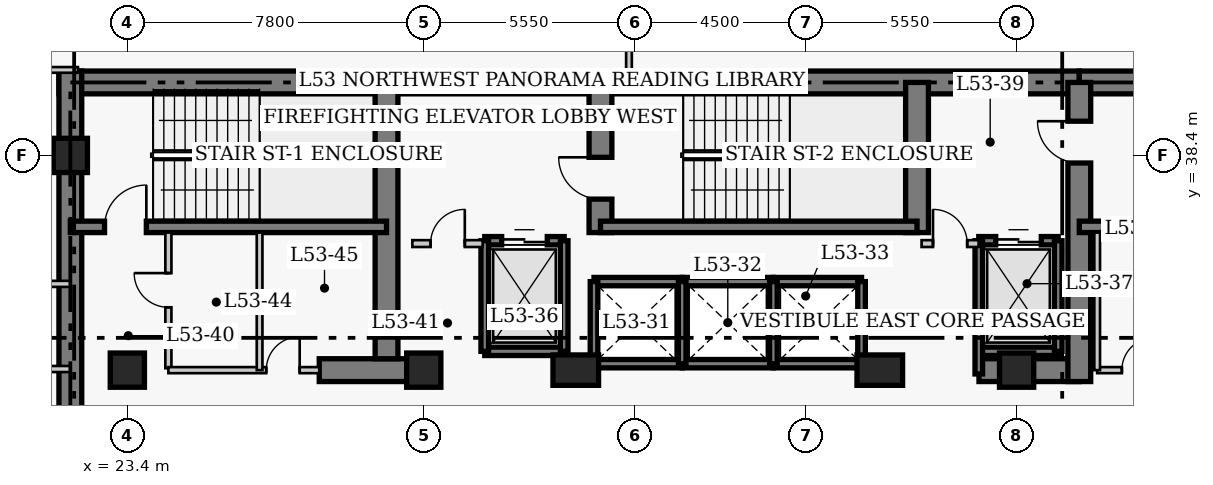
"""IFC4 building model, lengths in metres.
Left out: names, types, materials, properties, quantities, classifications, styles, units other than length and angle.
Written with IfcOpenShell. Run it as: python <this file> out.ifc"""

import sys

from ifc_helpers import new_model, si_unit, direction, frame, frame_2d, origin, origin_2d, place, context, subcontext, project, spatial, rectangle, extrude, element, fill, save


model = new_model("IFC4")
c1 = context("Model", 3, precision=1e-05, world=origin(), true_north=direction((0.0, 1.0)))
c2 = subcontext(c1, "Body", "Model", "MODEL_VIEW")
j1 = project(units=[si_unit("LENGTHUNIT", "METRE"), si_unit("PLANEANGLEUNIT", "RADIAN")], contexts=[c1])
p1 = place(None, origin())
s1 = spatial("IfcSite", under=j1, at=p1, CompositionType="ELEMENT")
p2 = place(p1, origin())
s2 = spatial("IfcBuilding", under=s1, at=p2, CompositionType="ELEMENT")
p3 = place(p2, frame((0.0, 0.0, 212.4)))
s3 = spatial("IfcBuildingStorey", under=s2, at=p3, CompositionType="ELEMENT", Elevation=212.4)
p4 = place(p3, frame((21.6, 40.32, 0.0), z_axis=(0.0, 0.0, 1.0), x_axis=(1.0, 0.0, 0.0)))
e1 = element("IfcWall", 1, at=p4, inside=s3, PredefinedType="SHEAR", context=c2, shape_type="SweptSolid", body=[
    extrude(rectangle(XDim=14.25, YDim=0.6, at=frame_2d((7.125, 0.0))), origin(), (0.0, 0.0, 1.0), 3.9),
])
p5 = place(p3, frame((35.85, 40.32, 0.0), z_axis=(0.0, 0.0, 1.0), x_axis=(1.0, 0.0, 0.0)))
e2 = element("IfcWall", 2, at=p5, inside=s3, PredefinedType="SHEAR", context=c2, shape_type="SweptSolid", body=[
    extrude(rectangle(XDim=12.6, YDim=0.6, at=frame_2d((6.3, 0.0))), origin(), (0.0, 0.0, 1.0), 3.9),
])
p6 = place(p3, frame((48.45, 40.32, 0.0), z_axis=(0.0, 0.0, 1.0), x_axis=(1.0, 0.0, 0.0)))
e3 = element("IfcWall", 3, at=p6, inside=s3, PredefinedType="SHEAR", context=c2, shape_type="SweptSolid", body=[
    extrude(rectangle(XDim=8.67, YDim=0.6, at=frame_2d((4.335, 0.0))), origin(), (0.0, 0.0, 1.0), 3.9),
])
p7 = place(p3, frame((21.9, 27.05, 0.0), z_axis=(0.0, 0.0, 1.0), x_axis=(0.0, 1.0, 0.0)))
e4 = element("IfcWall", 4, at=p7, inside=s3, PredefinedType="SHEAR", context=c2, shape_type="SweptSolid", body=[
    extrude(rectangle(XDim=13.57, YDim=0.6, at=frame_2d((6.785, 0.0))), origin(), (0.0, 0.0, 1.0), 3.9),
])
p8 = place(p3, frame((28.45, 32.75, 0.0), z_axis=(0.0, 0.0, 1.0), x_axis=(1.0, 0.0, 0.0)))
e5 = element("IfcWall", 5, at=p8, inside=s3, PredefinedType="SHEAR", context=c2, shape_type="SweptSolid", body=[
    extrude(rectangle(XDim=2.4, YDim=0.6, at=frame_2d((1.2, 0.0))), origin(), (0.0, 0.0, 1.0), 3.9),
])
p9 = place(p3, frame((45.81, 32.75, 0.0), z_axis=(0.0, 0.0, 1.0), x_axis=(1.0, 0.0, 0.0)))
e6 = element("IfcWall", 6, at=p9, inside=s3, PredefinedType="SHEAR", context=c2, shape_type="SweptSolid", body=[
    extrude(rectangle(XDim=2.64, YDim=0.6, at=frame_2d((1.32, 0.0))), origin(), (0.0, 0.0, 1.0), 3.9),
])
p10 = place(p3, frame((30.22, 33.05, 0.0), z_axis=(0.0, 0.0, 1.0), x_axis=(0.0, 1.0, 0.0)))
e7 = element("IfcWall", 7, at=p10, inside=s3, PredefinedType="SHEAR", context=c2, shape_type="SweptSolid", body=[
    extrude(rectangle(XDim=7.27, YDim=0.6, at=frame_2d((3.635, 0.0))), origin(), (0.0, 0.0, 1.0), 3.9),
])
p11 = place(p3, frame((35.85, 36.37, 0.0), z_axis=(0.0, 0.0, 1.0), x_axis=(0.0, 1.0, 0.0)))
e8 = element("IfcWall", 8, at=p11, inside=s3, PredefinedType="SHEAR", context=c2, shape_type="SweptSolid", body=[
    extrude(rectangle(XDim=3.95, YDim=0.6, at=frame_2d((1.975, 0.0))), origin(), (0.0, 0.0, 1.0), 3.9),
])
p12 = place(p11, frame((0.88, 0.0, 0.0)))
e9 = element("IfcOpeningElement", 9, at=p12, cuts=e8, PredefinedType="OPENING", context=c2, shape_type="SweptSolid", body=[
    extrude(rectangle(XDim=1.1, YDim=2.15, at=frame_2d((0.55, 1.075))), frame((0.0, 0.31, 0.0), z_axis=(0.0, -1.0, 0.0), x_axis=(1.0, 0.0, 0.0)), (0.0, 0.0, 1.0), 0.62),
])
p13 = place(p3, frame((44.18, 36.37, 0.0), z_axis=(0.0, 0.0, 1.0), x_axis=(0.0, 1.0, 0.0)))
e10 = element("IfcWall", 10, at=p13, inside=s3, PredefinedType="SHEAR", context=c2, shape_type="SweptSolid", body=[
    extrude(rectangle(XDim=3.95, YDim=0.6, at=frame_2d((1.975, 0.0))), origin(), (0.0, 0.0, 1.0), 3.9),
])
p14 = place(p3, frame((48.45, 32.45, 0.0), z_axis=(0.0, 0.0, 1.0), x_axis=(0.0, 1.0, 0.0)))
e11 = element("IfcWall", 11, at=p14, inside=s3, PredefinedType="SHEAR", context=c2, shape_type="SweptSolid", body=[
    extrude(rectangle(XDim=7.87, YDim=0.6, at=frame_2d((3.935, 0.0))), origin(), (0.0, 0.0, 1.0), 3.9),
])
p15 = place(p14, frame((5.75, 0.0, 0.0)))
e12 = element("IfcOpeningElement", 12, at=p15, cuts=e11, PredefinedType="OPENING", context=c2, shape_type="SweptSolid", body=[
    extrude(rectangle(XDim=1.1, YDim=2.15, at=frame_2d((0.55, 1.075))), frame((0.0, 0.31, 0.0), z_axis=(0.0, -1.0, 0.0), x_axis=(1.0, 0.0, 0.0)), (0.0, 0.0, 1.0), 0.62),
])
p16 = place(p3, frame((21.9, 36.52, 0.0), z_axis=(0.0, 0.0, 1.0), x_axis=(1.0, 0.0, 0.0)))
e13 = element("IfcWall", 13, at=p16, inside=s3, PredefinedType="SHEAR", context=c2, shape_type="SweptSolid", body=[
    extrude(rectangle(XDim=8.32, YDim=0.3, at=frame_2d((4.16, 0.0))), origin(), (0.0, 0.0, 1.0), 3.9),
])
p17 = place(p16, frame((0.9, 0.0, 0.0)))
e14 = element("IfcOpeningElement", 14, at=p17, cuts=e13, PredefinedType="OPENING", context=c2, shape_type="SweptSolid", body=[
    extrude(rectangle(XDim=1.1, YDim=2.15, at=frame_2d((0.55, 1.075))), frame((0.0, 0.16, 0.0), z_axis=(0.0, -1.0, 0.0), x_axis=(1.0, 0.0, 0.0)), (0.0, 0.0, 1.0), 0.32),
])
p18 = place(p3, frame((35.85, 36.52, 0.0), z_axis=(0.0, 0.0, 1.0), x_axis=(1.0, 0.0, 0.0)))
e15 = element("IfcWall", 15, at=p18, inside=s3, PredefinedType="SHEAR", context=c2, shape_type="SweptSolid", body=[
    extrude(rectangle(XDim=8.33, YDim=0.3, at=frame_2d((4.165, 0.0))), origin(), (0.0, 0.0, 1.0), 3.9),
])
p19 = place(p3, frame((48.45, 36.52, 0.0), z_axis=(0.0, 0.0, 1.0), x_axis=(1.0, 0.0, 0.0)))
e16 = element("IfcWall", 16, at=p19, inside=s3, PredefinedType="SHEAR", context=c2, shape_type="SweptSolid", body=[
    extrude(rectangle(XDim=8.37, YDim=0.3, at=frame_2d((4.185, 0.0))), origin(), (0.0, 0.0, 1.0), 3.9),
])
for number, where, z_axis, x_axis in (
    (17, (21.9, 38.4, 0.0), (0.0, 0.0, 1.0), (1.0, 0.0, 0.0)),
    (18, (23.4, 32.75, 0.0), (0.0, 0.0, 1.0), (1.0, 0.0, 0.0)),
    (19, (31.2, 32.75, 0.0), (0.0, 0.0, 1.0), (1.0, 0.0, 0.0)),
):
    element("IfcColumn", number, at=place(p3, frame(where, z_axis=z_axis, x_axis=x_axis)), inside=s3, PredefinedType="COLUMN", context=c2, shape_type="SweptSolid", body=[
        extrude(rectangle(XDim=0.9, YDim=0.9, at=origin_2d()), origin(), (0.0, 0.0, 1.0), 3.9),
    ])
for number, where, z_axis, x_axis in (
    (20, (35.2, 32.75, 0.0), (0.0, 0.0, 1.0), (1.0, 0.0, 0.0)),
    (21, (43.2, 32.75, 0.0), (0.0, 0.0, 1.0), (1.0, 0.0, 0.0)),
):
    element("IfcColumn", number, at=place(p3, frame(where, z_axis=z_axis, x_axis=x_axis)), inside=s3, PredefinedType="COLUMN", context=c2, shape_type="SweptSolid", body=[
        extrude(rectangle(XDim=1.2, YDim=0.8, at=origin_2d()), origin(), (0.0, 0.0, 1.0), 3.9),
    ])
p20 = place(p3, frame((46.8, 32.75, 0.0), z_axis=(0.0, 0.0, 1.0), x_axis=(1.0, 0.0, 0.0)))
e22 = element("IfcColumn", 22, at=p20, inside=s3, PredefinedType="COLUMN", context=c2, shape_type="SweptSolid", body=[
    extrude(rectangle(XDim=0.9, YDim=0.9, at=origin_2d()), origin(), (0.0, 0.0, 1.0), 3.9),
])
for number, where, z_axis, x_axis in (
    (23, (35.68, 35.08, 0.0), (0.0, 0.0, 1.0), (1.0, 0.0, 0.0)),
    (24, (35.68, 32.92, 0.0), (0.0, 0.0, 1.0), (1.0, 0.0, 0.0)),
):
    element("IfcWall", number, at=place(p3, frame(where, z_axis=z_axis, x_axis=x_axis)), inside=s3, PredefinedType="SHEAR", context=c2, shape_type="SweptSolid", body=[
        extrude(rectangle(XDim=2.32, YDim=0.22, at=frame_2d((1.16, 0.0))), origin(), (0.0, 0.0, 1.0), 3.9),
    ])
p21 = place(p3, frame((35.68, 32.92, 0.0), z_axis=(0.0, 0.0, 1.0), x_axis=(0.0, 1.0, 0.0)))
e25 = element("IfcWall", 25, at=p21, inside=s3, PredefinedType="SHEAR", context=c2, shape_type="SweptSolid", body=[
    extrude(rectangle(XDim=2.16, YDim=0.2, at=frame_2d((1.08, 0.0))), origin(), (0.0, 0.0, 1.0), 3.9),
])
for number, where, z_axis, x_axis in (
    (26, (38.0, 35.08, 0.0), (0.0, 0.0, 1.0), (1.0, 0.0, 0.0)),
    (27, (38.0, 32.92, 0.0), (0.0, 0.0, 1.0), (1.0, 0.0, 0.0)),
):
    element("IfcWall", number, at=place(p3, frame(where, z_axis=z_axis, x_axis=x_axis)), inside=s3, PredefinedType="SHEAR", context=c2, shape_type="SweptSolid", body=[
        extrude(rectangle(XDim=2.4, YDim=0.22, at=frame_2d((1.2, 0.0))), origin(), (0.0, 0.0, 1.0), 3.9),
    ])
p22 = place(p3, frame((38.0, 32.92, 0.0), z_axis=(0.0, 0.0, 1.0), x_axis=(0.0, 1.0, 0.0)))
e28 = element("IfcWall", 28, at=p22, inside=s3, PredefinedType="SHEAR", context=c2, shape_type="SweptSolid", body=[
    extrude(rectangle(XDim=2.16, YDim=0.2, at=frame_2d((1.08, 0.0))), origin(), (0.0, 0.0, 1.0), 3.9),
])
for number, where, z_axis, x_axis in (
    (29, (40.4, 35.08, 0.0), (0.0, 0.0, 1.0), (1.0, 0.0, 0.0)),
    (30, (40.4, 32.92, 0.0), (0.0, 0.0, 1.0), (1.0, 0.0, 0.0)),
):
    element("IfcWall", number, at=place(p3, frame(where, z_axis=z_axis, x_axis=x_axis)), inside=s3, PredefinedType="SHEAR", context=c2, shape_type="SweptSolid", body=[
        extrude(rectangle(XDim=2.32, YDim=0.22, at=frame_2d((1.16, 0.0))), origin(), (0.0, 0.0, 1.0), 3.9),
    ])
for number, where, z_axis, x_axis in (
    (31, (40.4, 32.92, 0.0), (0.0, 0.0, 1.0), (0.0, 1.0, 0.0)),
    (32, (42.72, 32.92, 0.0), (0.0, 0.0, 1.0), (0.0, 1.0, 0.0)),
):
    element("IfcWall", number, at=place(p3, frame(where, z_axis=z_axis, x_axis=x_axis)), inside=s3, PredefinedType="SHEAR", context=c2, shape_type="SweptSolid", body=[
        extrude(rectangle(XDim=2.16, YDim=0.2, at=frame_2d((1.08, 0.0))), origin(), (0.0, 0.0, 1.0), 3.9),
    ])
p23 = place(p3, frame((32.805, 36.155, 0.0), z_axis=(0.0, 0.0, 1.0), x_axis=(1.0, 0.0, 0.0)))
e33 = element("IfcWall", 33, at=p23, inside=s3, PredefinedType="SHEAR", context=c2, shape_type="SweptSolid", body=[
    extrude(rectangle(XDim=2.09, YDim=0.22, at=frame_2d((1.045, 0.0))), origin(), (0.0, 0.0, 1.0), 3.9),
])
p24 = place(p23, frame((0.445, 0.0, 0.0)))
e34 = element("IfcOpeningElement", 34, at=p24, cuts=e33, PredefinedType="OPENING", context=c2, shape_type="SweptSolid", body=[
    extrude(rectangle(XDim=1.2, YDim=2.15, at=frame_2d((0.6, 1.075))), frame((0.0, 0.12, 0.0), z_axis=(0.0, -1.0, 0.0), x_axis=(1.0, 0.0, 0.0)), (0.0, 0.0, 1.0), 0.24),
])
p25 = place(p3, frame((32.805, 33.245, 0.0), z_axis=(0.0, 0.0, 1.0), x_axis=(1.0, 0.0, 0.0)))
e35 = element("IfcWall", 35, at=p25, inside=s3, PredefinedType="SHEAR", context=c2, shape_type="SweptSolid", body=[
    extrude(rectangle(XDim=2.09, YDim=0.22, at=frame_2d((1.045, 0.0))), origin(), (0.0, 0.0, 1.0), 3.9),
])
for number, where, z_axis, x_axis in (
    (36, (32.805, 33.245, 0.0), (0.0, 0.0, 1.0), (0.0, 1.0, 0.0)),
    (37, (34.895, 33.245, 0.0), (0.0, 0.0, 1.0), (0.0, 1.0, 0.0)),
):
    element("IfcWall", number, at=place(p3, frame(where, z_axis=z_axis, x_axis=x_axis)), inside=s3, PredefinedType="SHEAR", context=c2, shape_type="SweptSolid", body=[
        extrude(rectangle(XDim=2.91, YDim=0.2, at=frame_2d((1.455, 0.0))), origin(), (0.0, 0.0, 1.0), 3.9),
    ])
p26 = place(p3, frame((45.805, 36.155, 0.0), z_axis=(0.0, 0.0, 1.0), x_axis=(1.0, 0.0, 0.0)))
e38 = element("IfcWall", 38, at=p26, inside=s3, PredefinedType="SHEAR", context=c2, shape_type="SweptSolid", body=[
    extrude(rectangle(XDim=2.09, YDim=0.22, at=frame_2d((1.045, 0.0))), origin(), (0.0, 0.0, 1.0), 3.9),
])
p27 = place(p26, frame((0.445, 0.0, 0.0)))
e39 = element("IfcOpeningElement", 39, at=p27, cuts=e38, PredefinedType="OPENING", context=c2, shape_type="SweptSolid", body=[
    extrude(rectangle(XDim=1.2, YDim=2.15, at=frame_2d((0.6, 1.075))), frame((0.0, 0.12, 0.0), z_axis=(0.0, -1.0, 0.0), x_axis=(1.0, 0.0, 0.0)), (0.0, 0.0, 1.0), 0.24),
])
p28 = place(p3, frame((45.805, 33.245, 0.0), z_axis=(0.0, 0.0, 1.0), x_axis=(1.0, 0.0, 0.0)))
e40 = element("IfcWall", 40, at=p28, inside=s3, PredefinedType="SHEAR", context=c2, shape_type="SweptSolid", body=[
    extrude(rectangle(XDim=2.09, YDim=0.22, at=frame_2d((1.045, 0.0))), origin(), (0.0, 0.0, 1.0), 3.9),
])
p29 = place(p3, frame((45.805, 32.65, 0.0), z_axis=(0.0, 0.0, 1.0), x_axis=(0.0, 1.0, 0.0)))
e41 = element("IfcWall", 41, at=p29, inside=s3, PredefinedType="SHEAR", context=c2, shape_type="SweptSolid", body=[
    extrude(rectangle(XDim=3.505, YDim=0.2, at=frame_2d((1.752, 0.0))), origin(), (0.0, 0.0, 1.0), 3.9),
])
p30 = place(p3, frame((47.895, 33.245, 0.0), z_axis=(0.0, 0.0, 1.0), x_axis=(0.0, 1.0, 0.0)))
e42 = element("IfcWall", 42, at=p30, inside=s3, PredefinedType="SHEAR", context=c2, shape_type="SweptSolid", body=[
    extrude(rectangle(XDim=2.91, YDim=0.2, at=frame_2d((1.455, 0.0))), origin(), (0.0, 0.0, 1.0), 3.9),
])
p31 = place(p3, frame((30.9, 36.08, 0.0), z_axis=(0.0, 0.0, 1.0), x_axis=(1.0, 0.0, 0.0)))
e43 = element("IfcWall", 43, at=p31, inside=s3, PredefinedType="PARTITIONING", context=c2, shape_type="SweptSolid", body=[
    extrude(rectangle(XDim=1.85, YDim=0.18, at=frame_2d((0.925, 0.0))), origin(), (0.0, 0.0, 1.0), 3.65),
])
p32 = place(p31, frame((0.48, 0.0, 0.0)))
e44 = element("IfcOpeningElement", 44, at=p32, cuts=e43, PredefinedType="OPENING", context=c2, shape_type="SweptSolid", body=[
    extrude(rectangle(XDim=0.9, YDim=2.15, at=frame_2d((0.45, 1.075))), frame((0.0, 0.1, 0.0), z_axis=(0.0, -1.0, 0.0), x_axis=(1.0, 0.0, 0.0)), (0.0, 0.0, 1.0), 0.2),
])
p33 = place(p3, frame((44.3, 36.08, 0.0), z_axis=(0.0, 0.0, 1.0), x_axis=(1.0, 0.0, 0.0)))
e45 = element("IfcWall", 45, at=p33, inside=s3, PredefinedType="PARTITIONING", context=c2, shape_type="SweptSolid", body=[
    extrude(rectangle(XDim=1.5, YDim=0.18, at=frame_2d((0.75, 0.0))), origin(), (0.0, 0.0, 1.0), 3.65),
])
p34 = place(p33, frame((0.3, 0.0, 0.0)))
e46 = element("IfcOpeningElement", 46, at=p34, cuts=e45, PredefinedType="OPENING", context=c2, shape_type="SweptSolid", body=[
    extrude(rectangle(XDim=0.9, YDim=2.15, at=frame_2d((0.45, 1.075))), frame((0.0, 0.1, 0.0), z_axis=(0.0, -1.0, 0.0), x_axis=(1.0, 0.0, 0.0)), (0.0, 0.0, 1.0), 0.2),
])
p35 = place(p3, frame((24.48, 32.8, 0.0), z_axis=(0.0, 0.0, 1.0), x_axis=(0.0, 1.0, 0.0)))
e47 = element("IfcWall", 47, at=p35, inside=s3, PredefinedType="PARTITIONING", context=c2, shape_type="SweptSolid", body=[
    extrude(rectangle(XDim=3.57, YDim=0.16, at=frame_2d((1.785, 0.0))), origin(), (0.0, 0.0, 1.0), 3.65),
])
p36 = place(p35, frame((1.604, 0.0, 0.0)))
e48 = element("IfcOpeningElement", 48, at=p36, cuts=e47, PredefinedType="OPENING", context=c2, shape_type="SweptSolid", body=[
    extrude(rectangle(XDim=0.9, YDim=2.1, at=frame_2d((0.45, 1.05))), frame((0.0, 0.09, 0.0), z_axis=(0.0, -1.0, 0.0), x_axis=(1.0, 0.0, 0.0)), (0.0, 0.0, 1.0), 0.18),
])
p37 = place(p3, frame((24.48, 32.75, 0.0), z_axis=(0.0, 0.0, 1.0), x_axis=(1.0, 0.0, 0.0)))
e49 = element("IfcWall", 49, at=p37, inside=s3, PredefinedType="PARTITIONING", context=c2, shape_type="SweptSolid", body=[
    extrude(rectangle(XDim=3.97, YDim=0.16, at=frame_2d((1.985, 0.0))), origin(), (0.0, 0.0, 1.0), 3.65),
])
p38 = place(p37, frame((2.575, 0.0, 0.0)))
e50 = element("IfcOpeningElement", 50, at=p38, cuts=e49, PredefinedType="OPENING", context=c2, shape_type="SweptSolid", body=[
    extrude(rectangle(XDim=0.88, YDim=2.05, at=frame_2d((0.44, 1.025))), frame((0.0, 0.09, 0.0), z_axis=(0.0, -1.0, 0.0), x_axis=(1.0, 0.0, 0.0)), (0.0, 0.0, 1.0), 0.18),
])
p39 = place(p3, frame((48.92, 32.75, 0.0), z_axis=(0.0, 0.0, 1.0), x_axis=(1.0, 0.0, 0.0)))
e51 = element("IfcWall", 51, at=p39, inside=s3, PredefinedType="PARTITIONING", context=c2, shape_type="SweptSolid", body=[
    extrude(rectangle(XDim=2.2, YDim=0.16, at=frame_2d((1.1, 0.0))), origin(), (0.0, 0.0, 1.0), 3.65),
])
p40 = place(p39, frame((0.65, 0.0, 0.0)))
e52 = element("IfcOpeningElement", 52, at=p40, cuts=e51, PredefinedType="OPENING", context=c2, shape_type="SweptSolid", body=[
    extrude(rectangle(XDim=0.86, YDim=2.05, at=frame_2d((0.43, 1.025))), frame((0.0, 0.09, 0.0), z_axis=(0.0, -1.0, 0.0), x_axis=(1.0, 0.0, 0.0)), (0.0, 0.0, 1.0), 0.18),
])
for number, where, z_axis, x_axis in (
    (53, (48.92, 32.75, 0.0), (0.0, 0.0, 1.0), (0.0, 1.0, 0.0)),
    (54, (26.88, 32.75, 0.0), (0.0, 0.0, 1.0), (0.0, 1.0, 0.0)),
):
    element("IfcWall", number, at=place(p3, frame(where, z_axis=z_axis, x_axis=x_axis)), inside=s3, PredefinedType="PARTITIONING", context=c2, shape_type="SweptSolid", body=[
        extrude(rectangle(XDim=3.62, YDim=0.15, at=frame_2d((1.81, 0.0))), origin(), (0.0, 0.0, 1.0), 3.65),
    ])
for number, where, z_axis, x_axis in (
    (55, (18.86, 35.02, 0.0), (0.0, 0.0, 1.0), (1.0, 0.0, 0.0)),
    (56, (18.86, 32.78, 0.0), (0.0, 0.0, 1.0), (1.0, 0.0, 0.0)),
):
    element("IfcWall", number, at=place(p3, frame(where, z_axis=z_axis, x_axis=x_axis)), inside=s3, PredefinedType="PARTITIONING", context=c2, shape_type="SweptSolid", body=[
        extrude(rectangle(XDim=3.04, YDim=0.16, at=frame_2d((1.52, 0.0))), origin(), (0.0, 0.0, 1.0), 3.65),
    ])
p41 = place(p3, frame((16.64, 40.65, 0.0), z_axis=(0.0, 0.0, 1.0), x_axis=(1.0, 0.0, 0.0)))
e57 = element("IfcWall", 57, at=p41, inside=s3, PredefinedType="PARTITIONING", context=c2, shape_type="SweptSolid", body=[
    extrude(rectangle(XDim=5.46, YDim=0.15, at=frame_2d((2.73, 0.0))), origin(), (0.0, 0.0, 1.0), 3.65),
])
p42 = place(p41, frame((0.55, 0.0, 0.0)))
e58 = element("IfcOpeningElement", 58, at=p42, cuts=e57, PredefinedType="OPENING", context=c2, shape_type="SweptSolid", body=[
    extrude(rectangle(XDim=1.0, YDim=2.15, at=frame_2d((0.5, 1.075))), frame((0.0, 0.085, 0.0), z_axis=(0.0, -1.0, 0.0), x_axis=(1.0, 0.0, 0.0)), (0.0, 0.0, 1.0), 0.17),
])
p43 = place(p3, frame((36.6, 40.32, 0.0), z_axis=(0.0, 0.0, 1.0), x_axis=(0.0, 1.0, 0.0)))
e59 = element("IfcWall", 59, at=p43, inside=s3, PredefinedType="PARTITIONING", context=c2, shape_type="SweptSolid", body=[
    extrude(rectangle(XDim=2.345, YDim=0.15, at=frame_2d((1.172, 0.0))), origin(), (0.0, 0.0, 1.0), 3.65),
])
p44 = place(p24, origin())
e60 = element("IfcDoor", 60, at=p44, inside=s3, OperationType="DOUBLE_DOOR_SLIDING", PredefinedType="DOOR", context=c2, shape_type="SweptSolid", body=[
    extrude(rectangle(XDim=1.2, YDim=2.15, at=frame_2d((0.6, 1.075))), frame((0.0, 0.025, 0.0), z_axis=(0.0, -1.0, 0.0), x_axis=(1.0, 0.0, 0.0)), (0.0, 0.0, 1.0), 0.05),
])
fill(e34, e60)
p45 = place(p27, origin())
e61 = element("IfcDoor", 61, at=p45, inside=s3, OperationType="DOUBLE_DOOR_SLIDING", PredefinedType="DOOR", context=c2, shape_type="SweptSolid", body=[
    extrude(rectangle(XDim=1.2, YDim=2.15, at=frame_2d((0.6, 1.075))), frame((0.0, 0.025, 0.0), z_axis=(0.0, -1.0, 0.0), x_axis=(1.0, 0.0, 0.0)), (0.0, 0.0, 1.0), 0.05),
])
fill(e39, e61)
p46 = place(p32, origin())
e62 = element("IfcDoor", 62, at=p46, inside=s3, OperationType="SINGLE_SWING_RIGHT", PredefinedType="DOOR", context=c2, shape_type="SweptSolid", body=[
    extrude(rectangle(XDim=0.9, YDim=2.15, at=frame_2d((0.45, 1.075))), frame((0.0, 0.025, 0.0), z_axis=(0.0, -1.0, 0.0), x_axis=(1.0, 0.0, 0.0)), (0.0, 0.0, 1.0), 0.05),
])
fill(e44, e62)
p47 = place(p34, origin())
e63 = element("IfcDoor", 63, at=p47, inside=s3, OperationType="SINGLE_SWING_LEFT", PredefinedType="DOOR", context=c2, shape_type="SweptSolid", body=[
    extrude(rectangle(XDim=0.9, YDim=2.15, at=frame_2d((0.45, 1.075))), frame((0.0, 0.025, 0.0), z_axis=(0.0, -1.0, 0.0), x_axis=(1.0, 0.0, 0.0)), (0.0, 0.0, 1.0), 0.05),
])
fill(e46, e63)
p48 = place(p36, origin())
e64 = element("IfcDoor", 64, at=p48, inside=s3, OperationType="SINGLE_SWING_RIGHT", PredefinedType="DOOR", context=c2, shape_type="SweptSolid", body=[
    extrude(rectangle(XDim=0.9, YDim=2.1, at=frame_2d((0.45, 1.05))), frame((0.0, 0.025, 0.0), z_axis=(0.0, -1.0, 0.0), x_axis=(1.0, 0.0, 0.0)), (0.0, 0.0, 1.0), 0.05),
])
fill(e48, e64)
p49 = place(p38, origin())
e65 = element("IfcDoor", 65, at=p49, inside=s3, OperationType="SINGLE_SWING_RIGHT", PredefinedType="DOOR", context=c2, shape_type="SweptSolid", body=[
    extrude(rectangle(XDim=0.88, YDim=2.05, at=frame_2d((0.44, 1.025))), frame((0.0, 0.025, 0.0), z_axis=(0.0, -1.0, 0.0), x_axis=(1.0, 0.0, 0.0)), (0.0, 0.0, 1.0), 0.05),
])
fill(e50, e65)
p50 = place(p40, origin())
e66 = element("IfcDoor", 66, at=p50, inside=s3, OperationType="SINGLE_SWING_RIGHT", PredefinedType="DOOR", context=c2, shape_type="SweptSolid", body=[
    extrude(rectangle(XDim=0.86, YDim=2.05, at=frame_2d((0.43, 1.025))), frame((0.0, 0.025, 0.0), z_axis=(0.0, -1.0, 0.0), x_axis=(1.0, 0.0, 0.0)), (0.0, 0.0, 1.0), 0.05),
])
fill(e52, e66)
p51 = place(p17, origin())
e67 = element("IfcDoor", 67, at=p51, inside=s3, OperationType="SINGLE_SWING_RIGHT", PredefinedType="DOOR", context=c2, shape_type="SweptSolid", body=[
    extrude(rectangle(XDim=1.1, YDim=2.15, at=frame_2d((0.55, 1.075))), frame((0.0, 0.025, 0.0), z_axis=(0.0, -1.0, 0.0), x_axis=(1.0, 0.0, 0.0)), (0.0, 0.0, 1.0), 0.05),
])
fill(e14, e67)
p52 = place(p12, origin())
e68 = element("IfcDoor", 68, at=p52, inside=s3, OperationType="SINGLE_SWING_RIGHT", PredefinedType="DOOR", context=c2, shape_type="SweptSolid", body=[
    extrude(rectangle(XDim=1.1, YDim=2.15, at=frame_2d((0.55, 1.075))), frame((0.0, 0.025, 0.0), z_axis=(0.0, -1.0, 0.0), x_axis=(1.0, 0.0, 0.0)), (0.0, 0.0, 1.0), 0.05),
])
fill(e9, e68)
p53 = place(p15, origin())
e69 = element("IfcDoor", 69, at=p53, inside=s3, OperationType="SINGLE_SWING_RIGHT", PredefinedType="DOOR", context=c2, shape_type="SweptSolid", body=[
    extrude(rectangle(XDim=1.1, YDim=2.15, at=frame_2d((0.55, 1.075))), frame((0.0, 0.025, 0.0), z_axis=(0.0, -1.0, 0.0), x_axis=(1.0, 0.0, 0.0)), (0.0, 0.0, 1.0), 0.05),
])
fill(e12, e69)
save(model, sys.argv[1])
